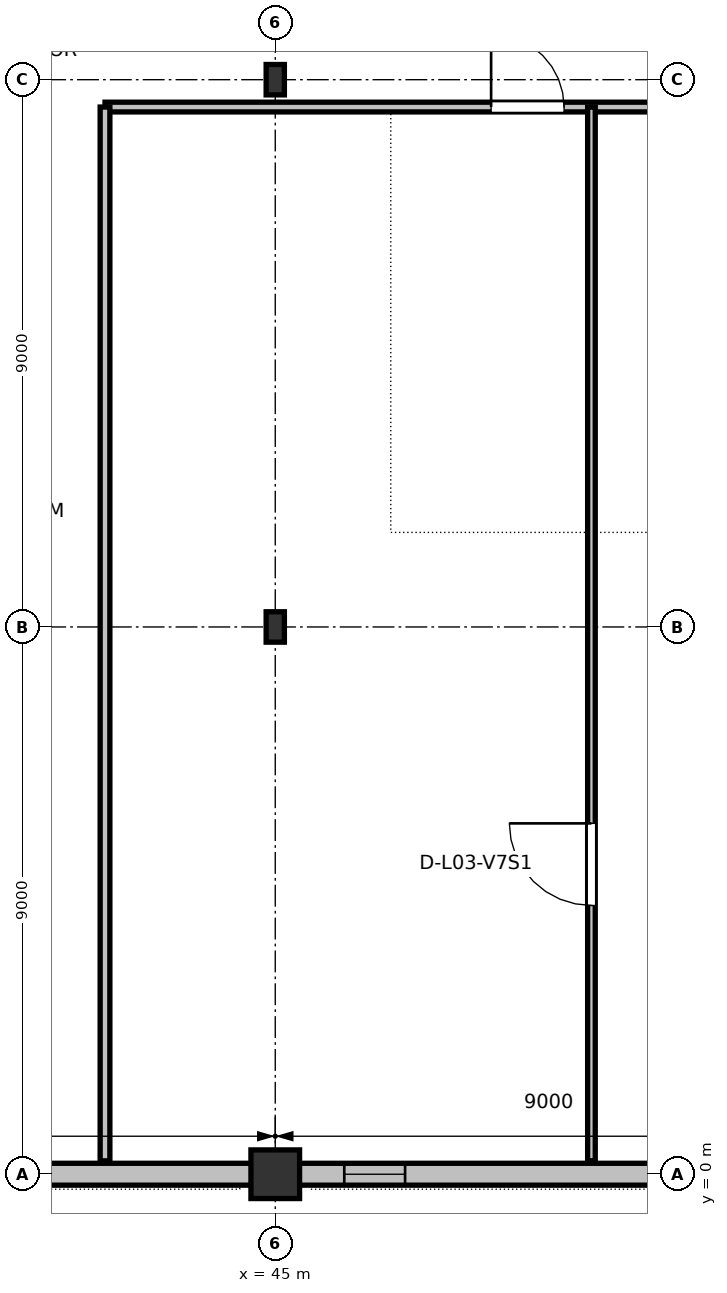
"""IFC4 building model, lengths in metres.
Left out: names, types, materials, properties, quantities, classifications, styles, units other than length and angle.
Written with IfcOpenShell. Run it as: python <this file> out.ifc"""

import sys

from ifc_helpers import new_model, si_unit, direction, frame, frame_2d, origin, origin_2d, place, context, subcontext, project, spatial, rectangle, i_section, extrude, element, fill, save


model = new_model("IFC4")
c1 = context("Model", 3, precision=1e-05, world=origin(), true_north=direction((0.0, 1.0)))
c2 = subcontext(c1, "Body", "Model", "MODEL_VIEW")
j1 = project(units=[si_unit("LENGTHUNIT", "METRE"), si_unit("PLANEANGLEUNIT", "RADIAN")], contexts=[c1])
p1 = place(None, origin())
s1 = spatial("IfcSite", under=j1, at=p1, CompositionType="ELEMENT")
p2 = place(p1, origin())
s2 = spatial("IfcBuilding", under=s1, at=p2, CompositionType="ELEMENT")
p3 = place(p2, frame((0.0, 0.0, 15.0)))
s3 = spatial("IfcBuildingStorey", under=s2, at=p3, CompositionType="ELEMENT", Elevation=15.0)
p4 = place(p3, frame((45.0, 0.0, 0.0), z_axis=(0.0, 0.0, 1.0), x_axis=(1.0, 0.0, 0.0)))
e1 = element("IfcColumn", 1, at=p4, inside=s3, PredefinedType="COLUMN", context=c2, shape_type="SweptSolid", body=[
    extrude(rectangle(XDim=0.8, YDim=0.8, at=origin_2d()), origin(), (0.0, 0.0, 1.0), 4.2),
])
for number, where, z_axis, x_axis in (
    (2, (45.0, 9.0, 0.0), (0.0, 0.0, 1.0), (1.0, 0.0, 0.0)),
    (3, (45.0, 18.0, 0.0), (0.0, 0.0, 1.0), (1.0, 0.0, 0.0)),
):
    element("IfcColumn", number, at=place(p3, frame(where, z_axis=z_axis, x_axis=x_axis)), inside=s3, PredefinedType="COLUMN", context=c2, shape_type="SweptSolid", body=[
        extrude(i_section(OverallWidth=0.3, OverallDepth=0.5, WebThickness=0.014, FlangeThickness=0.028, at=origin_2d()), origin(), (0.0, 0.0, 1.0), 4.2),
    ])
p5 = place(p3, frame((36.385, 0.0, 0.0), z_axis=(0.0, 0.0, 1.0), x_axis=(1.0, 0.0, 0.0)))
e4 = element("IfcWall", 4, at=p5, inside=s3, PredefinedType="STANDARD", context=c2, shape_type="SweptSolid", body=[
    extrude(rectangle(XDim=8.23, YDim=0.36, at=frame_2d((4.115, 0.0))), origin(), (0.0, 0.0, 1.0), 3.635),
])
p6 = place(p5, frame((0.75, 0.0, 0.9)))
e5 = element("IfcOpeningElement", 5, at=p6, cuts=e4, PredefinedType="OPENING", context=c2, shape_type="SweptSolid", body=[
    extrude(rectangle(XDim=1.2, YDim=1.4, at=frame_2d((0.6, 0.7))), frame((0.0, 0.19, 0.0), z_axis=(0.0, -1.0, 0.0), x_axis=(1.0, 0.0, 0.0)), (0.0, 0.0, 1.0), 0.38),
])
p7 = place(p3, frame((45.385, 0.0, 0.0), z_axis=(0.0, 0.0, 1.0), x_axis=(1.0, 0.0, 0.0)))
e6 = element("IfcWall", 6, at=p7, inside=s3, PredefinedType="STANDARD", context=c2, shape_type="SweptSolid", body=[
    extrude(rectangle(XDim=8.23, YDim=0.36, at=frame_2d((4.115, 0.0))), origin(), (0.0, 0.0, 1.0), 3.635),
])
p8 = place(p7, frame((0.75, 0.0, 0.9)))
e7 = element("IfcOpeningElement", 7, at=p8, cuts=e6, PredefinedType="OPENING", context=c2, shape_type="SweptSolid", body=[
    extrude(rectangle(XDim=1.0, YDim=1.35, at=frame_2d((0.5, 0.675))), frame((0.0, 0.19, 0.0), z_axis=(0.0, -1.0, 0.0), x_axis=(1.0, 0.0, 0.0)), (0.0, 0.0, 1.0), 0.38),
])
p9 = place(p3, frame((42.2, 17.55, 0.0), z_axis=(0.0, 0.0, 1.0), x_axis=(1.0, 0.0, 0.0)))
e8 = element("IfcWall", 8, at=p9, inside=s3, PredefinedType="PARTITIONING", context=c2, shape_type="SweptSolid", body=[
    extrude(rectangle(XDim=23.6, YDim=0.16, at=frame_2d((11.8, 0.0))), origin(), (0.0, 0.0, 1.0), 3.96),
])
p10 = place(p9, frame((6.35, 0.0, 0.0)))
e9 = element("IfcOpeningElement", 9, at=p10, cuts=e8, PredefinedType="OPENING", context=c2, shape_type="SweptSolid", body=[
    extrude(rectangle(XDim=1.2, YDim=2.18, at=frame_2d((0.6, 1.09))), frame((0.0, 0.09, 0.0), z_axis=(0.0, -1.0, 0.0), x_axis=(1.0, 0.0, 0.0)), (0.0, 0.0, 1.0), 0.18),
])
p11 = place(p9, frame((15.6, 0.0, 0.0)))
e10 = element("IfcOpeningElement", 10, at=p11, cuts=e8, PredefinedType="OPENING", context=c2, shape_type="SweptSolid", body=[
    extrude(rectangle(XDim=1.3, YDim=2.18, at=frame_2d((0.65, 1.09))), frame((0.0, 0.09, 0.0), z_axis=(0.0, -1.0, 0.0), x_axis=(1.0, 0.0, 0.0)), (0.0, 0.0, 1.0), 0.18),
])
p12 = place(p9, frame((21.7, 0.0, 0.0)))
e11 = element("IfcOpeningElement", 11, at=p12, cuts=e8, PredefinedType="OPENING", context=c2, shape_type="SweptSolid", body=[
    extrude(rectangle(XDim=1.45, YDim=2.22, at=frame_2d((0.725, 1.11))), frame((0.0, 0.09, 0.0), z_axis=(0.0, -1.0, 0.0), x_axis=(1.0, 0.0, 0.0)), (0.0, 0.0, 1.0), 0.18),
])
p13 = place(p3, frame((42.2, 0.22, 0.0), z_axis=(0.0, 0.0, 1.0), x_axis=(0.0, 1.0, 0.0)))
e12 = element("IfcWall", 12, at=p13, inside=s3, PredefinedType="PARTITIONING", context=c2, shape_type="SweptSolid", body=[
    extrude(rectangle(XDim=17.33, YDim=0.16, at=frame_2d((8.665, 0.0))), origin(), (0.0, 0.0, 1.0), 3.96),
])
p14 = place(p3, frame((50.2, 0.22, 0.0), z_axis=(0.0, 0.0, 1.0), x_axis=(0.0, 1.0, 0.0)))
e13 = element("IfcWall", 13, at=p14, inside=s3, PredefinedType="PARTITIONING", context=c2, shape_type="SweptSolid", body=[
    extrude(rectangle(XDim=17.33, YDim=0.125, at=frame_2d((8.665, 0.0))), origin(), (0.0, 0.0, 1.0), 3.96),
])
p15 = place(p14, frame((4.2, 0.0, 0.0)))
e14 = element("IfcOpeningElement", 14, at=p15, cuts=e13, PredefinedType="OPENING", context=c2, shape_type="SweptSolid", body=[
    extrude(rectangle(XDim=1.35, YDim=2.18, at=frame_2d((0.675, 1.09))), frame((0.0, 0.073, 0.0), z_axis=(0.0, -1.0, 0.0), x_axis=(1.0, 0.0, 0.0)), (0.0, 0.0, 1.0), 0.145),
])
p16 = place(p8, origin())
e15 = element("IfcWindow", 15, at=p16, inside=s3, PartitioningType="SINGLE_PANEL", PredefinedType="WINDOW", context=c2, shape_type="SweptSolid", body=[
    extrude(rectangle(XDim=1.0, YDim=1.35, at=frame_2d((0.5, 0.675))), frame((0.0, 0.03, 0.0), z_axis=(0.0, -1.0, 0.0), x_axis=(1.0, 0.0, 0.0)), (0.0, 0.0, 1.0), 0.06),
])
fill(e7, e15)
p17 = place(p10, origin())
e16 = element("IfcDoor", 16, at=p17, inside=s3, OperationType="SINGLE_SWING_LEFT", PredefinedType="DOOR", context=c2, shape_type="SweptSolid", body=[
    extrude(rectangle(XDim=1.2, YDim=2.18, at=frame_2d((0.6, 1.09))), frame((0.0, 0.025, 0.0), z_axis=(0.0, -1.0, 0.0), x_axis=(1.0, 0.0, 0.0)), (0.0, 0.0, 1.0), 0.05),
])
fill(e9, e16)
p18 = place(p15, origin())
e17 = element("IfcDoor", 17, at=p18, inside=s3, OperationType="SINGLE_SWING_RIGHT", PredefinedType="DOOR", context=c2, shape_type="SweptSolid", body=[
    extrude(rectangle(XDim=1.35, YDim=2.18, at=frame_2d((0.675, 1.09))), frame((0.0, 0.025, 0.0), z_axis=(0.0, -1.0, 0.0), x_axis=(1.0, 0.0, 0.0)), (0.0, 0.0, 1.0), 0.05),
])
fill(e14, e17)
save(model, sys.argv[1])
